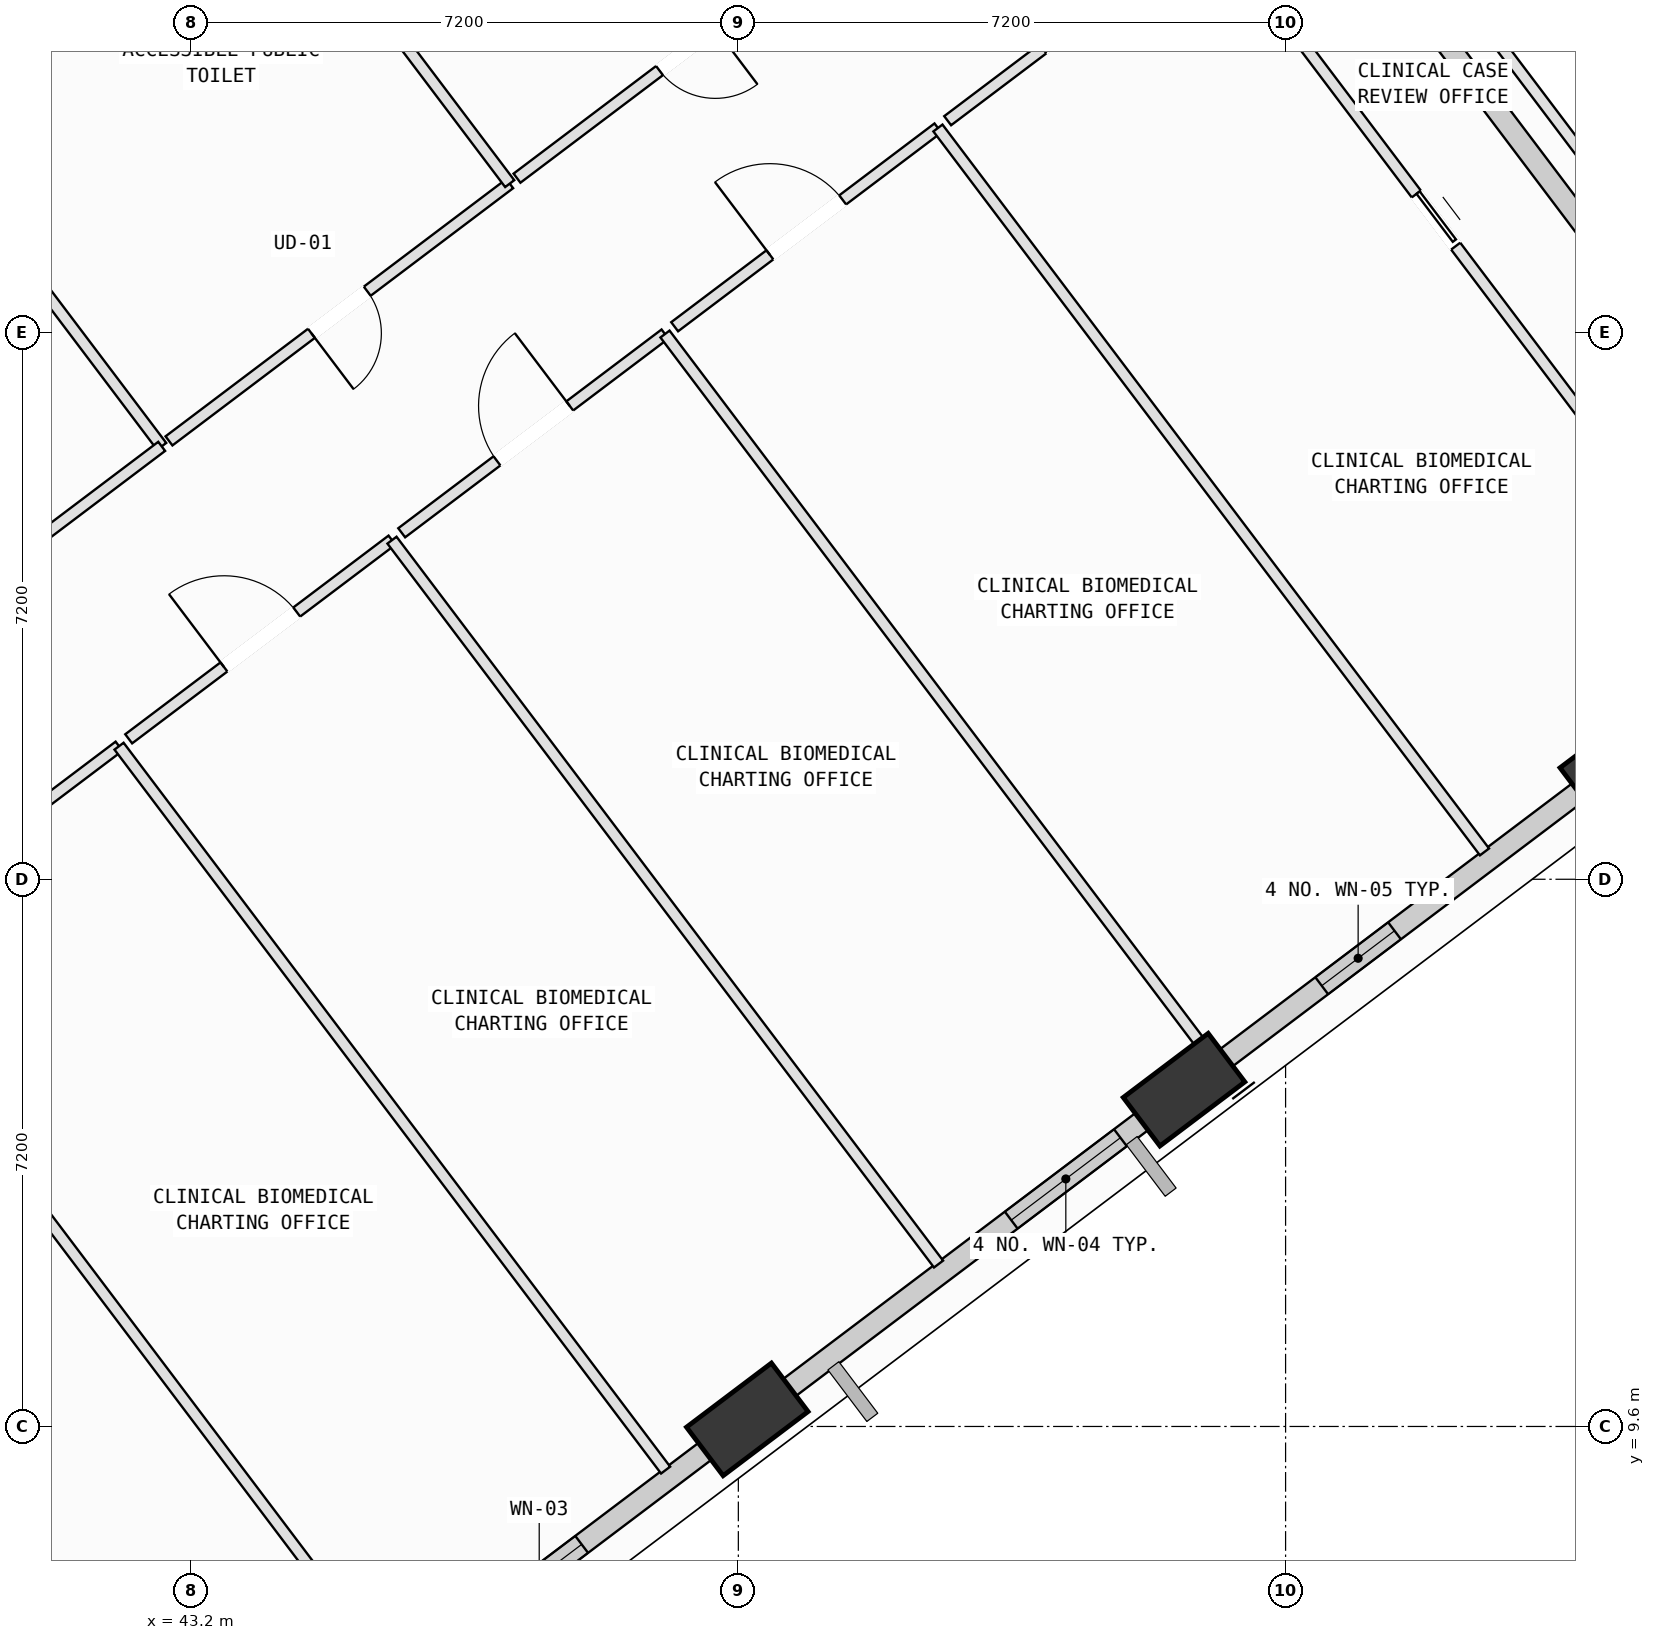
"""IFC4 building model, lengths in metres.
Left out: names, types, materials, properties, quantities, classifications, styles, units other than length and angle.
Written with IfcOpenShell. Run it as: python <this file> out.ifc"""

import sys

from ifc_helpers import new_model, si_unit, direction, frame, frame_2d, origin, origin_2d, place, context, subcontext, project, spatial, rectangle, extrude, element, fill, save


model = new_model("IFC4")
c1 = context("Model", 3, precision=1e-05, world=origin(), true_north=direction((0.0, 1.0)))
c2 = subcontext(c1, "Body", "Model", "MODEL_VIEW")
j1 = project(units=[si_unit("LENGTHUNIT", "METRE"), si_unit("PLANEANGLEUNIT", "RADIAN")], contexts=[c1])
p1 = place(None, origin())
s1 = spatial("IfcSite", under=j1, at=p1, CompositionType="ELEMENT")
p2 = place(p1, origin())
s2 = spatial("IfcBuilding", under=s1, at=p2, CompositionType="ELEMENT")
p3 = place(p2, frame((0.0, 0.0, 181.8)))
s3 = spatial("IfcBuildingStorey", under=s2, at=p3, CompositionType="ELEMENT", Elevation=181.8)
p4 = place(p3, frame((50.518, 9.693, 0.002), z_axis=(0.061795746377, 0.070371730864, 0.995604894135), x_axis=(-0.995519092087, 0.075879665536, 0.05642706485)))
e1 = element("IfcColumn", 1, at=p4, inside=s3, PredefinedType="COLUMN", context=c2, shape_type="SweptSolid", body=[
    extrude(rectangle(XDim=1.4, YDim=0.8, at=origin_2d()), origin(), (0.0, 0.0, 1.0), 4.014),
])
p5 = place(p3, frame((56.264, 14.031, 0.002), z_axis=(0.04356733554, 0.093818641665, 0.994635586408), x_axis=(-0.97627215668, -0.207384521289, 0.062324444817)))
e2 = element("IfcColumn", 2, at=p5, inside=s3, PredefinedType="COLUMN", context=c2, shape_type="SweptSolid", body=[
    extrude(rectangle(XDim=1.4, YDim=0.8, at=origin_2d()), origin(), (0.0, 0.0, 1.0), 4.018),
])
p6 = place(p3, frame((62.01, 18.369, 0.002), z_axis=(0.025473116254, 0.117176334771, 0.992784380879), x_axis=(-0.906962067297, -0.414969728359, 0.072249104005)))
e3 = element("IfcColumn", 3, at=p6, inside=s3, PredefinedType="COLUMN", context=c2, shape_type="SweptSolid", body=[
    extrude(rectangle(XDim=1.4, YDim=0.8, at=origin_2d()), origin(), (0.0, 0.0, 1.0), 4.025),
])
p7 = place(p3, frame((50.27, 9.506, 0.0), z_axis=(0.0, 0.0, 1.0), x_axis=(-0.798099248816, -0.60252600694, 0.0)))
e4 = element("IfcWall", 4, at=p7, inside=s3, PredefinedType="SOLIDWALL", context=c2, shape_type="SweptSolid", body=[
    extrude(rectangle(XDim=6.209, YDim=0.28, at=frame_2d((3.104, 0.0))), origin(), (0.0, 0.0, 1.0), 3.265),
])
p8 = place(p7, frame((2.419, 0.0, 0.75)))
e5 = element("IfcOpeningElement", 5, at=p8, cuts=e4, PredefinedType="OPENING", context=c2, shape_type="SweptSolid", body=[
    extrude(rectangle(XDim=1.4, YDim=1.85, at=frame_2d((0.7, 0.925))), frame((0.0, 0.15, 0.0), z_axis=(0.0, -1.0, 0.0), x_axis=(1.0, 0.0, 0.0)), (0.0, 0.0, 1.0), 0.3),
])
p9 = place(p3, frame((56.022, 13.849, 0.0), z_axis=(0.0, 0.0, 1.0), x_axis=(-0.798130372836, -0.602484778196, 0.0)))
e6 = element("IfcWall", 6, at=p9, inside=s3, PredefinedType="SOLIDWALL", context=c2, shape_type="SweptSolid", body=[
    extrude(rectangle(XDim=6.218, YDim=0.28, at=frame_2d((3.109, 0.0))), origin(), (0.0, 0.0, 1.0), 3.265),
])
p10 = place(p9, frame((0.746, 0.0, 0.75)))
e7 = element("IfcOpeningElement", 7, at=p10, cuts=e6, PredefinedType="OPENING", context=c2, shape_type="SweptSolid", body=[
    extrude(rectangle(XDim=1.8, YDim=2.05, at=frame_2d((0.9, 1.025))), frame((0.0, 0.15, 0.0), z_axis=(0.0, -1.0, 0.0), x_axis=(1.0, 0.0, 0.0)), (0.0, 0.0, 1.0), 0.3),
])
p11 = place(p3, frame((61.781, 18.196, 0.0), z_axis=(0.0, 0.0, 1.0), x_axis=(-0.798123503481, -0.602493878136, 0.0)))
e8 = element("IfcWall", 8, at=p11, inside=s3, PredefinedType="SOLIDWALL", context=c2, shape_type="SweptSolid", body=[
    extrude(rectangle(XDim=6.242, YDim=0.28, at=frame_2d((3.121, 0.0))), origin(), (0.0, 0.0, 1.0), 3.265),
])
p12 = place(p11, frame((3.442, 0.0, 0.75)))
e9 = element("IfcOpeningElement", 9, at=p12, cuts=e8, PredefinedType="OPENING", context=c2, shape_type="SweptSolid", body=[
    extrude(rectangle(XDim=1.2, YDim=1.75, at=frame_2d((0.6, 0.875))), frame((0.0, 0.15, 0.0), z_axis=(0.0, -1.0, 0.0), x_axis=(1.0, 0.0, 0.0)), (0.0, 0.0, 1.0), 0.3),
])
p13 = place(p3, frame((58.515, 29.389, 0.0), z_axis=(0.0, 0.0, 1.0), x_axis=(0.602492713857, -0.79812438238, 0.0)))
e10 = element("IfcWall", 10, at=p13, inside=s3, PredefinedType="SOLIDWALL", context=c2, shape_type="SweptSolid", body=[
    extrude(rectangle(XDim=6.84, YDim=0.28, at=frame_2d((3.42, 0.0))), origin(), (0.0, 0.0, 1.0), 3.265),
])
p14 = place(p3, frame((36.15, 11.862, 0.0), z_axis=(0.0, 0.0, 1.0), x_axis=(0.602487751948, -0.79812812803, 0.0)))
e11 = element("IfcWall", 11, at=p14, inside=s3, PredefinedType="PARTITIONING", context=c2, shape_type="SweptSolid", body=[
    extrude(rectangle(XDim=10.273, YDim=0.15, at=frame_2d((5.136, 0.0))), origin(), (0.0, 0.0, 1.0), 3.78),
])
p15 = place(p14, frame((4.706, 0.0, 0.0)))
e12 = element("IfcOpeningElement", 12, at=p15, cuts=e11, PredefinedType="OPENING", context=c2, shape_type="SweptSolid", body=[
    extrude(rectangle(XDim=0.86, YDim=2.06, at=frame_2d((0.43, 1.03))), frame((0.0, 0.085, 0.0), z_axis=(0.0, -1.0, 0.0), x_axis=(1.0, 0.0, 0.0)), (0.0, 0.0, 1.0), 0.17),
])
p16 = place(p3, frame((38.66, 15.84, 0.0), z_axis=(0.0, 0.0, 1.0), x_axis=(0.602494190997, -0.798123267306, 0.0)))
e13 = element("IfcWall", 13, at=p16, inside=s3, PredefinedType="PARTITIONING", context=c2, shape_type="SweptSolid", body=[
    extrude(rectangle(XDim=11.936, YDim=0.15, at=frame_2d((5.968, 0.0))), origin(), (0.0, 0.0, 1.0), 3.78),
])
p17 = place(p3, frame((38.788, 15.936, 0.0), z_axis=(0.0, 0.0, 1.0), x_axis=(0.798105957369, 0.602517120763, 0.0)))
e14 = element("IfcWall", 14, at=p17, inside=s3, PredefinedType="PARTITIONING", context=c2, shape_type="SweptSolid", body=[
    extrude(rectangle(XDim=4.34, YDim=0.15, at=frame_2d((2.17, 0.0))), origin(), (0.0, 0.0, 1.0), 3.78),
])
p18 = place(p17, frame((1.57, 0.0, 0.0)))
e15 = element("IfcOpeningElement", 15, at=p18, cuts=e14, PredefinedType="OPENING", context=c2, shape_type="SweptSolid", body=[
    extrude(rectangle(XDim=1.2, YDim=2.15, at=frame_2d((0.6, 1.075))), frame((0.0, 0.085, 0.0), z_axis=(0.0, -1.0, 0.0), x_axis=(1.0, 0.0, 0.0)), (0.0, 0.0, 1.0), 0.17),
])
p19 = place(p3, frame((42.252, 18.551, 0.0), z_axis=(0.0, 0.0, 1.0), x_axis=(0.602533536667, -0.798093564184, 0.0)))
e16 = element("IfcWall", 16, at=p19, inside=s3, PredefinedType="PARTITIONING", context=c2, shape_type="SweptSolid", body=[
    extrude(rectangle(XDim=11.935, YDim=0.15, at=frame_2d((5.967, 0.0))), origin(), (0.0, 0.0, 1.0), 3.78),
])
p20 = place(p3, frame((42.379, 18.648, 0.0), z_axis=(0.0, 0.0, 1.0), x_axis=(0.798234572406, 0.602346716946, 0.0)))
e17 = element("IfcWall", 17, at=p20, inside=s3, PredefinedType="PARTITIONING", context=c2, shape_type="SweptSolid", body=[
    extrude(rectangle(XDim=4.34, YDim=0.15, at=frame_2d((2.17, 0.0))), origin(), (0.0, 0.0, 1.0), 3.78),
])
p21 = place(p20, frame((1.57, 0.0, 0.0)))
e18 = element("IfcOpeningElement", 18, at=p21, cuts=e17, PredefinedType="OPENING", context=c2, shape_type="SweptSolid", body=[
    extrude(rectangle(XDim=1.2, YDim=2.15, at=frame_2d((0.6, 1.075))), frame((0.0, 0.085, 0.0), z_axis=(0.0, -1.0, 0.0), x_axis=(1.0, 0.0, 0.0)), (0.0, 0.0, 1.0), 0.17),
])
p22 = place(p3, frame((45.843, 21.262, 0.0), z_axis=(0.0, 0.0, 1.0), x_axis=(0.602530343885, -0.798095974616, 0.0)))
e19 = element("IfcWall", 19, at=p22, inside=s3, PredefinedType="PARTITIONING", context=c2, shape_type="SweptSolid", body=[
    extrude(rectangle(XDim=11.935, YDim=0.15, at=frame_2d((5.967, 0.0))), origin(), (0.0, 0.0, 1.0), 3.415),
])
p23 = place(p3, frame((51.198, 9.919, 0.0), z_axis=(0.0, 0.0, 1.0), x_axis=(-0.798339084961, -0.602208191097, 0.0)))
e20 = element("IfcWall", 20, at=p23, inside=s3, PredefinedType="PARTITIONING", context=c2, shape_type="SweptSolid", body=[
    extrude(rectangle(XDim=0.99, YDim=0.15, at=frame_2d((0.495, 0.0))), origin(), (0.0, 0.0, 1.0), 3.265),
])
p24 = place(p3, frame((45.971, 21.359, 0.0), z_axis=(0.0, 0.0, 1.0), x_axis=(0.79809932877, 0.602525901035, 0.0)))
e21 = element("IfcWall", 21, at=p24, inside=s3, PredefinedType="PARTITIONING", context=c2, shape_type="SweptSolid", body=[
    extrude(rectangle(XDim=4.34, YDim=0.15, at=frame_2d((2.17, 0.0))), origin(), (0.0, 0.0, 1.0), 3.78),
])
p25 = place(p24, frame((1.57, 0.0, 0.0)))
e22 = element("IfcOpeningElement", 22, at=p25, cuts=e21, PredefinedType="OPENING", context=c2, shape_type="SweptSolid", body=[
    extrude(rectangle(XDim=1.2, YDim=2.15, at=frame_2d((0.6, 1.075))), frame((0.0, 0.085, 0.0), z_axis=(0.0, -1.0, 0.0), x_axis=(1.0, 0.0, 0.0)), (0.0, 0.0, 1.0), 0.17),
])
p26 = place(p3, frame((49.435, 23.974, 0.0), z_axis=(0.0, 0.0, 1.0), x_axis=(0.60250679657, -0.798113751346, 0.0)))
e23 = element("IfcWall", 23, at=p26, inside=s3, PredefinedType="PARTITIONING", context=c2, shape_type="SweptSolid", body=[
    extrude(rectangle(XDim=12.28, YDim=0.15, at=frame_2d((6.14, 0.0))), origin(), (0.0, 0.0, 1.0), 3.78),
])
p27 = place(p3, frame((56.834, 14.173, 0.0), z_axis=(0.0, 0.0, 1.0), x_axis=(-0.798155005104, -0.602452145674, 0.0)))
e24 = element("IfcWall", 24, at=p27, inside=s3, PredefinedType="PARTITIONING", context=c2, shape_type="SweptSolid", body=[
    extrude(rectangle(XDim=0.843, YDim=0.15, at=frame_2d((0.422, 0.0))), origin(), (0.0, 0.0, 1.0), 3.265),
])
p28 = place(p3, frame((49.562, 24.07, 0.0), z_axis=(0.0, 0.0, 1.0), x_axis=(0.798105957369, 0.602517120763, 0.0)))
e25 = element("IfcWall", 25, at=p28, inside=s3, PredefinedType="PARTITIONING", context=c2, shape_type="SweptSolid", body=[
    extrude(rectangle(XDim=4.34, YDim=0.15, at=frame_2d((2.17, 0.0))), origin(), (0.0, 0.0, 1.0), 3.065),
])
p29 = place(p28, frame((1.57, 0.0, 0.0)))
e26 = element("IfcOpeningElement", 26, at=p29, cuts=e25, PredefinedType="OPENING", context=c2, shape_type="SweptSolid", body=[
    extrude(rectangle(XDim=1.2, YDim=2.15, at=frame_2d((0.6, 1.075))), frame((0.0, 0.085, 0.0), z_axis=(0.0, -1.0, 0.0), x_axis=(1.0, 0.0, 0.0)), (0.0, 0.0, 1.0), 0.17),
])
p30 = place(p3, frame((53.026, 26.685, 0.0), z_axis=(0.0, 0.0, 1.0), x_axis=(0.602533536667, -0.798093564184, 0.0)))
e27 = element("IfcWall", 27, at=p30, inside=s3, PredefinedType="PARTITIONING", context=c2, shape_type="SweptSolid", body=[
    extrude(rectangle(XDim=11.935, YDim=0.15, at=frame_2d((5.967, 0.0))), origin(), (0.0, 0.0, 1.0), 3.78),
])
p31 = place(p3, frame((53.154, 26.781, 0.0), z_axis=(0.0, 0.0, 1.0), x_axis=(0.798105957369, 0.602517120763, 0.0)))
e28 = element("IfcWall", 28, at=p31, inside=s3, PredefinedType="PARTITIONING", context=c2, shape_type="SweptSolid", body=[
    extrude(rectangle(XDim=4.34, YDim=0.15, at=frame_2d((2.17, 0.0))), origin(), (0.0, 0.0, 1.0), 3.065),
])
p32 = place(p31, frame((1.57, 0.0, 0.0)))
e29 = element("IfcOpeningElement", 29, at=p32, cuts=e28, PredefinedType="OPENING", context=c2, shape_type="SweptSolid", body=[
    extrude(rectangle(XDim=1.2, YDim=2.15, at=frame_2d((0.6, 1.075))), frame((0.0, 0.085, 0.0), z_axis=(0.0, -1.0, 0.0), x_axis=(1.0, 0.0, 0.0)), (0.0, 0.0, 1.0), 0.17),
])
p33 = place(p3, frame((56.618, 29.396, 0.0), z_axis=(0.0, 0.0, 1.0), x_axis=(0.602496773162, -0.798121318053, 0.0)))
e30 = element("IfcWall", 30, at=p33, inside=s3, PredefinedType="PARTITIONING", context=c2, shape_type="SweptSolid", body=[
    extrude(rectangle(XDim=9.829, YDim=0.15, at=frame_2d((4.915, 0.0))), origin(), (0.0, 0.0, 1.0), 3.78),
])
p34 = place(p33, frame((4.485, 0.0, 0.0)))
e31 = element("IfcOpeningElement", 31, at=p34, cuts=e30, PredefinedType="OPENING", context=c2, shape_type="SweptSolid", body=[
    extrude(rectangle(XDim=0.86, YDim=2.06, at=frame_2d((0.43, 1.03))), frame((0.0, 0.085, 0.0), z_axis=(0.0, -1.0, 0.0), x_axis=(1.0, 0.0, 0.0)), (0.0, 0.0, 1.0), 0.17),
])
p35 = place(p3, frame((39.243, 27.225, 0.0), z_axis=(0.0, 0.0, 1.0), x_axis=(0.602515370823, -0.798107278455, 0.0)))
e32 = element("IfcWall", 32, at=p35, inside=s3, PredefinedType="PARTITIONING", context=c2, shape_type="SweptSolid", body=[
    extrude(rectangle(XDim=5.925, YDim=0.15, at=frame_2d((2.963, 0.0))), origin(), (0.0, 0.0, 1.0), 3.78),
])
p36 = place(p3, frame((42.813, 22.496, 0.0), z_axis=(0.0, 0.0, 1.0), x_axis=(-0.798022287303, -0.602627935768, 0.0)))
e33 = element("IfcWall", 33, at=p36, inside=s3, PredefinedType="PARTITIONING", context=c2, shape_type="SweptSolid", body=[
    extrude(rectangle(XDim=3.014, YDim=0.15, at=frame_2d((1.507, 0.0))), origin(), (0.0, 0.0, 1.0), 3.78),
])
p37 = place(p3, frame((47.392, 25.953, 0.0), z_axis=(0.0, 0.0, 1.0), x_axis=(-0.79808188884, -0.602549001083, 0.0)))
e34 = element("IfcWall", 34, at=p37, inside=s3, PredefinedType="PARTITIONING", context=c2, shape_type="SweptSolid", body=[
    extrude(rectangle(XDim=5.617, YDim=0.15, at=frame_2d((2.809, 0.0))), origin(), (0.0, 0.0, 1.0), 3.78),
])
p38 = place(p37, frame((2.349, 0.0, 0.0)))
e35 = element("IfcOpeningElement", 35, at=p38, cuts=e34, PredefinedType="OPENING", context=c2, shape_type="SweptSolid", body=[
    extrude(rectangle(XDim=0.92, YDim=2.1, at=frame_2d((0.46, 1.05))), frame((0.0, 0.085, 0.0), z_axis=(0.0, -1.0, 0.0), x_axis=(1.0, 0.0, 0.0)), (0.0, 0.0, 1.0), 0.17),
])
p39 = place(p3, frame((43.822, 30.682, 0.0), z_axis=(0.0, 0.0, 1.0), x_axis=(0.602515370823, -0.798107278455, 0.0)))
e36 = element("IfcWall", 36, at=p39, inside=s3, PredefinedType="PARTITIONING", context=c2, shape_type="SweptSolid", body=[
    extrude(rectangle(XDim=5.925, YDim=0.15, at=frame_2d((2.963, 0.0))), origin(), (0.0, 0.0, 1.0), 3.78),
])
p40 = place(p3, frame((51.972, 29.41, 0.0), z_axis=(0.0, 0.0, 1.0), x_axis=(-0.798108322746, -0.602513987525, 0.0)))
e37 = element("IfcWall", 37, at=p40, inside=s3, PredefinedType="PARTITIONING", context=c2, shape_type="SweptSolid", body=[
    extrude(rectangle(XDim=5.618, YDim=0.15, at=frame_2d((2.809, 0.0))), origin(), (0.0, 0.0, 1.0), 3.78),
])
p41 = place(p40, frame((2.349, 0.0, 0.0)))
e38 = element("IfcOpeningElement", 38, at=p41, cuts=e37, PredefinedType="OPENING", context=c2, shape_type="SweptSolid", body=[
    extrude(rectangle(XDim=0.92, YDim=2.1, at=frame_2d((0.46, 1.05))), frame((0.0, 0.085, 0.0), z_axis=(0.0, -1.0, 0.0), x_axis=(1.0, 0.0, 0.0)), (0.0, 0.0, 1.0), 0.17),
])
p42 = place(p3, frame((58.22, 30.693, 0.0), z_axis=(0.0, 0.0, 1.0), x_axis=(0.60252193275, -0.798102324615, 0.0)))
e39 = element("IfcWall", 39, at=p42, inside=s3, PredefinedType="PARTITIONING", context=c2, shape_type="SweptSolid", body=[
    extrude(rectangle(XDim=9.669, YDim=0.15, at=frame_2d((4.834, 0.0))), origin(), (0.0, 0.0, 1.0), 3.265),
])
p43 = place(p8, origin())
e40 = element("IfcWindow", 40, at=p43, inside=s3, PartitioningType="SINGLE_PANEL", PredefinedType="WINDOW", context=c2, shape_type="SweptSolid", body=[
    extrude(rectangle(XDim=1.4, YDim=1.85, at=frame_2d((0.7, 0.925))), frame((0.0, 0.03, 0.0), z_axis=(0.0, -1.0, 0.0), x_axis=(1.0, 0.0, 0.0)), (0.0, 0.0, 1.0), 0.06),
])
fill(e5, e40)
p44 = place(p10, origin())
e41 = element("IfcWindow", 41, at=p44, inside=s3, PartitioningType="SINGLE_PANEL", PredefinedType="WINDOW", context=c2, shape_type="SweptSolid", body=[
    extrude(rectangle(XDim=1.8, YDim=2.05, at=frame_2d((0.9, 1.025))), frame((0.0, 0.03, 0.0), z_axis=(0.0, -1.0, 0.0), x_axis=(1.0, 0.0, 0.0)), (0.0, 0.0, 1.0), 0.06),
])
fill(e7, e41)
p45 = place(p12, origin())
e42 = element("IfcWindow", 42, at=p45, inside=s3, PartitioningType="SINGLE_PANEL", PredefinedType="WINDOW", context=c2, shape_type="SweptSolid", body=[
    extrude(rectangle(XDim=1.2, YDim=1.75, at=frame_2d((0.6, 0.875))), frame((0.0, 0.03, 0.0), z_axis=(0.0, -1.0, 0.0), x_axis=(1.0, 0.0, 0.0)), (0.0, 0.0, 1.0), 0.06),
])
fill(e9, e42)
p46 = place(p21, origin())
e43 = element("IfcDoor", 43, at=p46, inside=s3, OperationType="SINGLE_SWING_LEFT", PredefinedType="DOOR", context=c2, shape_type="SweptSolid", body=[
    extrude(rectangle(XDim=1.2, YDim=2.15, at=frame_2d((0.6, 1.075))), frame((0.0, 0.025, 0.0), z_axis=(0.0, -1.0, 0.0), x_axis=(1.0, 0.0, 0.0)), (0.0, 0.0, 1.0), 0.05),
])
fill(e18, e43)
p47 = place(p25, origin())
e44 = element("IfcDoor", 44, at=p47, inside=s3, OperationType="SINGLE_SWING_RIGHT", PredefinedType="DOOR", context=c2, shape_type="SweptSolid", body=[
    extrude(rectangle(XDim=1.2, YDim=2.15, at=frame_2d((0.6, 1.075))), frame((0.0, 0.025, 0.0), z_axis=(0.0, -1.0, 0.0), x_axis=(1.0, 0.0, 0.0)), (0.0, 0.0, 1.0), 0.05),
])
fill(e22, e44)
p48 = place(p29, origin())
e45 = element("IfcDoor", 45, at=p48, inside=s3, OperationType="SINGLE_SWING_LEFT", PredefinedType="DOOR", context=c2, shape_type="SweptSolid", body=[
    extrude(rectangle(XDim=1.2, YDim=2.15, at=frame_2d((0.6, 1.075))), frame((0.0, 0.025, 0.0), z_axis=(0.0, -1.0, 0.0), x_axis=(1.0, 0.0, 0.0)), (0.0, 0.0, 1.0), 0.05),
])
fill(e26, e45)
p49 = place(p38, origin())
e46 = element("IfcDoor", 46, at=p49, inside=s3, OperationType="SINGLE_SWING_RIGHT", PredefinedType="DOOR", context=c2, shape_type="SweptSolid", body=[
    extrude(rectangle(XDim=0.92, YDim=2.1, at=frame_2d((0.46, 1.05))), frame((0.0, 0.025, 0.0), z_axis=(0.0, -1.0, 0.0), x_axis=(1.0, 0.0, 0.0)), (0.0, 0.0, 1.0), 0.05),
])
fill(e35, e46)
p50 = place(p41, origin())
e47 = element("IfcDoor", 47, at=p50, inside=s3, OperationType="SINGLE_SWING_LEFT", PredefinedType="DOOR", context=c2, shape_type="SweptSolid", body=[
    extrude(rectangle(XDim=0.92, YDim=2.1, at=frame_2d((0.46, 1.05))), frame((0.0, 0.025, 0.0), z_axis=(0.0, -1.0, 0.0), x_axis=(1.0, 0.0, 0.0)), (0.0, 0.0, 1.0), 0.05),
])
fill(e38, e47)
p51 = place(p34, origin())
e48 = element("IfcDoor", 48, at=p51, inside=s3, OperationType="SLIDING_TO_LEFT", PredefinedType="DOOR", context=c2, shape_type="SweptSolid", body=[
    extrude(rectangle(XDim=0.86, YDim=2.06, at=frame_2d((0.43, 1.03))), frame((0.0, 0.025, 0.0), z_axis=(0.0, -1.0, 0.0), x_axis=(1.0, 0.0, 0.0)), (0.0, 0.0, 1.0), 0.05),
])
fill(e31, e48)
save(model, sys.argv[1])
